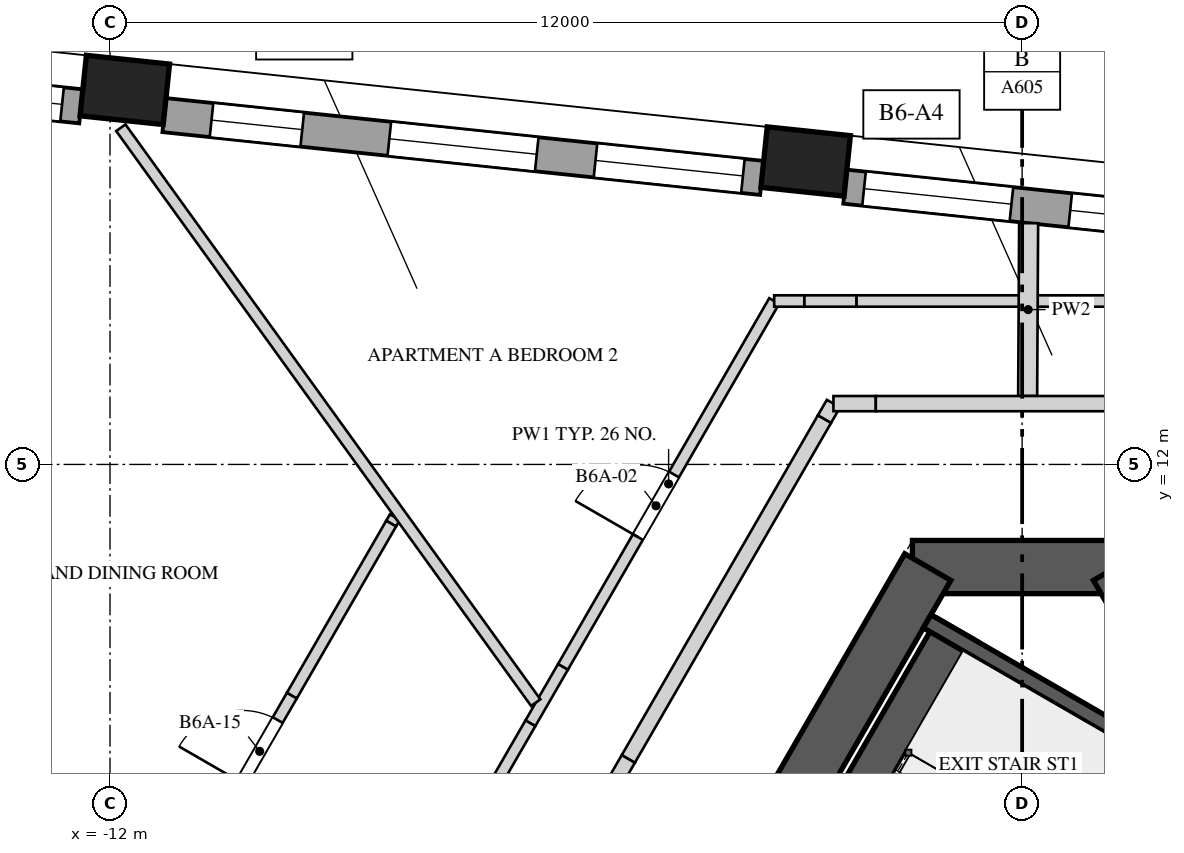
"""IFC4 building model, lengths in metres.
Left out: names, types, materials, properties, quantities, classifications, styles, units other than length and angle.
Written with IfcOpenShell. Run it as: python <this file> out.ifc"""

import sys

from ifc_helpers import new_model, si_unit, direction, frame, frame_2d, origin, origin_2d, place, context, subcontext, project, spatial, polyline, rectangle, outline, extrude, element, fill, save


model = new_model("IFC4")
c1 = context("Model", 3, precision=1e-05, world=origin(), true_north=direction((0.0, 1.0)))
c2 = subcontext(c1, "Body", "Model", "MODEL_VIEW")
j1 = project(units=[si_unit("LENGTHUNIT", "METRE"), si_unit("PLANEANGLEUNIT", "RADIAN")], contexts=[c1])
p1 = place(None, origin())
s1 = spatial("IfcSite", under=j1, at=p1, CompositionType="ELEMENT")
p2 = place(p1, origin())
s2 = spatial("IfcBuilding", under=s1, at=p2, CompositionType="ELEMENT")
p3 = place(p2, frame((0.0, 0.0, 245.2)))
s3 = spatial("IfcBuildingStorey", under=s2, at=p3, CompositionType="ELEMENT", Elevation=245.2)
p4 = place(p3, frame((1.443, 10.65, 0.0), z_axis=(0.0, 0.0, 1.0), x_axis=(-1.0, 0.0, 0.0)))
e1 = element("IfcWall", 1, at=p4, inside=s3, PredefinedType="SHEAR", context=c2, shape_type="SweptSolid", body=[
    extrude(rectangle(XDim=2.887, YDim=0.7, at=frame_2d((1.443, 0.0))), origin(), (0.0, 0.0, 1.0), 4.0),
])
p5 = place(p3, frame((-1.241, 10.65, 0.0), z_axis=(0.0, 0.0, 1.0), x_axis=(-0.500003331888, -0.866023480109, 0.0)))
e2 = element("IfcWall", 2, at=p5, inside=s3, PredefinedType="SHEAR", context=c2, shape_type="SweptSolid", body=[
    extrude(rectangle(XDim=17.205, YDim=0.7, at=frame_2d((8.603, 0.0))), origin(), (0.0, 0.0, 1.0), 4.0),
])
p6 = place(p5, frame((6.808, 0.0, 0.0)))
e3 = element("IfcOpeningElement", 3, at=p6, cuts=e2, PredefinedType="OPENING", context=c2, shape_type="SweptSolid", body=[
    extrude(rectangle(XDim=1.0, YDim=2.4, at=frame_2d((0.5, 1.2))), frame((0.0, 0.36, 0.0), z_axis=(0.0, -1.0, 0.0), x_axis=(1.0, 0.0, 0.0)), (0.0, 0.0, 1.0), 0.72),
])
p7 = place(p5, frame((14.922, 0.0, 0.0)))
e4 = element("IfcOpeningElement", 4, at=p7, cuts=e2, PredefinedType="OPENING", context=c2, shape_type="SweptSolid", body=[
    extrude(rectangle(XDim=0.8, YDim=2.1, at=frame_2d((0.4, 1.05))), frame((0.0, 0.36, 0.0), z_axis=(0.0, -1.0, 0.0), x_axis=(1.0, 0.0, 0.0)), (0.0, 0.0, 1.0), 0.72),
])
p8 = place(p3, frame((9.844, -4.25, 0.0), z_axis=(0.0, 0.0, 1.0), x_axis=(-0.500003331888, 0.866023480109, 0.0)))
e5 = element("IfcWall", 5, at=p8, inside=s3, PredefinedType="SHEAR", context=c2, shape_type="SweptSolid", body=[
    extrude(rectangle(XDim=17.205, YDim=0.7, at=frame_2d((8.603, 0.0))), origin(), (0.0, 0.0, 1.0), 4.0),
])
p9 = place(p8, frame((6.877, 0.0, 0.0)))
e6 = element("IfcOpeningElement", 6, at=p9, cuts=e5, PredefinedType="OPENING", context=c2, shape_type="SweptSolid", body=[
    extrude(rectangle(XDim=1.0, YDim=2.4, at=frame_2d((0.5, 1.2))), frame((0.0, 0.36, 0.0), z_axis=(0.0, -1.0, 0.0), x_axis=(1.0, 0.0, 0.0)), (0.0, 0.0, 1.0), 0.72),
])
for number, where, z_axis, x_axis in (
    (7, (-2.848, 15.985, 0.0), (0.0, 0.0, 1.0), (-0.995, 0.105, 0.0)),
    (8, (-11.805, 16.927, 0.0), (0.0, 0.0, 1.0), (-0.995, 0.105, 0.0)),
):
    element("IfcColumn", number, at=place(p3, frame(where, z_axis=z_axis, x_axis=x_axis)), inside=s3, PredefinedType="COLUMN", context=c2, shape_type="SweptSolid", body=[
        extrude(rectangle(XDim=1.1, YDim=0.8, at=origin_2d()), origin(), (0.0, 0.0, 1.0), 4.0),
    ])
p10 = place(p3, frame((5.534, 14.828, 0.0), z_axis=(0.0, 0.0, 1.0), x_axis=(-0.994522865711, 0.104519230663, 0.0)))
e9 = element("IfcWall", 9, at=p10, inside=s3, PredefinedType="SOLIDWALL", context=c2, shape_type="SweptSolid", body=[
    extrude(rectangle(XDim=7.907, YDim=0.45, at=frame_2d((3.953, 0.0))), origin(), (0.0, 0.0, 1.0), 3.3),
])
p11 = place(p10, frame((0.251, 0.0, 0.4)))
e10 = element("IfcOpeningElement", 10, at=p11, cuts=e9, PredefinedType="OPENING", context=c2, shape_type="SweptSolid", body=[
    extrude(rectangle(XDim=1.95, YDim=2.75, at=frame_2d((0.975, 1.375))), frame((0.0, 0.235, 0.0), z_axis=(0.0, -1.0, 0.0), x_axis=(1.0, 0.0, 0.0)), (0.0, 0.0, 1.0), 0.47),
])
p12 = place(p10, frame((2.978, 0.0, 0.4)))
e11 = element("IfcOpeningElement", 11, at=p12, cuts=e9, PredefinedType="OPENING", context=c2, shape_type="SweptSolid", body=[
    extrude(rectangle(XDim=1.95, YDim=2.75, at=frame_2d((0.975, 1.375))), frame((0.0, 0.235, 0.0), z_axis=(0.0, -1.0, 0.0), x_axis=(1.0, 0.0, 0.0)), (0.0, 0.0, 1.0), 0.47),
])
p13 = place(p10, frame((5.706, 0.0, 0.4)))
e12 = element("IfcOpeningElement", 12, at=p13, cuts=e9, PredefinedType="OPENING", context=c2, shape_type="SweptSolid", body=[
    extrude(rectangle(XDim=1.95, YDim=2.75, at=frame_2d((0.975, 1.375))), frame((0.0, 0.235, 0.0), z_axis=(0.0, -1.0, 0.0), x_axis=(1.0, 0.0, 0.0)), (0.0, 0.0, 1.0), 0.47),
])
p14 = place(p3, frame((-3.424, 15.769, 0.0), z_axis=(0.0, 0.0, 1.0), x_axis=(-0.994522528385, 0.104522440343, 0.0)))
e13 = element("IfcWall", 13, at=p14, inside=s3, PredefinedType="SOLIDWALL", context=c2, shape_type="SweptSolid", body=[
    extrude(rectangle(XDim=7.906, YDim=0.45, at=frame_2d((3.953, 0.0))), origin(), (0.0, 0.0, 1.0), 3.3),
])
p15 = place(p14, frame((0.251, 0.0, 0.4)))
e14 = element("IfcOpeningElement", 14, at=p15, cuts=e13, PredefinedType="OPENING", context=c2, shape_type="SweptSolid", body=[
    extrude(rectangle(XDim=1.95, YDim=2.75, at=frame_2d((0.975, 1.375))), frame((0.0, 0.235, 0.0), z_axis=(0.0, -1.0, 0.0), x_axis=(1.0, 0.0, 0.0)), (0.0, 0.0, 1.0), 0.47),
])
p16 = place(p14, frame((2.978, 0.0, 0.4)))
e15 = element("IfcOpeningElement", 15, at=p16, cuts=e13, PredefinedType="OPENING", context=c2, shape_type="SweptSolid", body=[
    extrude(rectangle(XDim=1.95, YDim=2.75, at=frame_2d((0.975, 1.375))), frame((0.0, 0.235, 0.0), z_axis=(0.0, -1.0, 0.0), x_axis=(1.0, 0.0, 0.0)), (0.0, 0.0, 1.0), 0.47),
])
p17 = place(p14, frame((6.081, 0.0, 0.4)))
e16 = element("IfcOpeningElement", 16, at=p17, cuts=e13, PredefinedType="OPENING", context=c2, shape_type="SweptSolid", body=[
    extrude(rectangle(XDim=1.2, YDim=2.75, at=frame_2d((0.6, 1.375))), frame((0.0, 0.235, 0.0), z_axis=(0.0, -1.0, 0.0), x_axis=(1.0, 0.0, 0.0)), (0.0, 0.0, 1.0), 0.47),
])
p18 = place(p3, frame((-12.381, 16.711, 0.0), z_axis=(0.0, 0.0, 1.0), x_axis=(-0.994520717537, 0.104539668977, 0.0)))
e17 = element("IfcWall", 17, at=p18, inside=s3, PredefinedType="SOLIDWALL", context=c2, shape_type="SweptSolid", body=[
    extrude(rectangle(XDim=2.452, YDim=0.45, at=frame_2d((1.226, 0.0))), origin(), (0.0, 0.0, 1.0), 3.3),
])
p19 = place(p18, frame((0.251, 0.0, 0.4)))
e18 = element("IfcOpeningElement", 18, at=p19, cuts=e17, PredefinedType="OPENING", context=c2, shape_type="SweptSolid", body=[
    extrude(rectangle(XDim=1.95, YDim=2.75, at=frame_2d((0.975, 1.375))), frame((0.0, 0.235, 0.0), z_axis=(0.0, -1.0, 0.0), x_axis=(1.0, 0.0, 0.0)), (0.0, 0.0, 1.0), 0.47),
])
p20 = place(p3, frame((-0.853, 9.823, 0.0), z_axis=(0.0, 0.0, 1.0), x_axis=(-0.500009909098, -0.866019682689, 0.0)))
e19 = element("IfcWall", 19, at=p20, inside=s3, PredefinedType="SOLIDWALL", context=c2, shape_type="SweptSolid", body=[
    extrude(rectangle(XDim=6.2, YDim=0.6, at=frame_2d((3.1, 0.0))), origin(), (0.0, 0.0, 1.0), 3.65),
])
p21 = place(p3, frame((1.876, 8.85, 0.0), z_axis=(0.0, 0.0, 1.0), x_axis=(-0.499998042495, -0.866026533947, 0.0)))
e20 = element("IfcWall", 20, at=p21, inside=s3, PredefinedType="SOLIDWALL", context=c2, shape_type="SweptSolid", body=[
    extrude(rectangle(XDim=6.723, YDim=0.2, at=frame_2d((3.361, 0.0))), origin(), (0.0, 0.0, 1.0), 3.65),
])
p22 = place(p3, frame((1.479, 8.361, 0.0), z_axis=(0.0, 0.0, 1.0), x_axis=(-0.866035871367, 0.499981869177, 0.0)))
e21 = element("IfcWall", 21, at=p22, inside=s3, PredefinedType="SOLIDWALL", context=c2, shape_type="SweptSolid", body=[
    extrude(rectangle(XDim=3.15, YDim=0.2, at=frame_2d((1.575, 0.0))), origin(), (0.0, 0.0, 1.0), 3.65),
])
p23 = place(p3, frame((-7.38, 7.017, 0.0), z_axis=(0.0, 0.0, 1.0), x_axis=(0.500012159746, 0.866018383238, 0.0)))
e22 = element("IfcWall", 22, at=p23, inside=s3, PredefinedType="PARTITIONING", context=c2, shape_type="SweptSolid", body=[
    extrude(rectangle(XDim=1.824, YDim=0.15, at=frame_2d((0.912, 0.0))), origin(), (0.0, 0.0, 1.0), 3.65),
])
p24 = place(p3, frame((-6.468, 8.597, 0.0), z_axis=(0.0, 0.0, 1.0), x_axis=(0.500035209441, 0.86600507465, 0.0)))
e23 = element("IfcWall", 23, at=p24, inside=s3, PredefinedType="PARTITIONING", context=c2, shape_type="SweptSolid", body=[
    extrude(rectangle(XDim=0.856, YDim=0.15, at=frame_2d((0.428, 0.0))), origin(), (0.0, 0.0, 1.0), 2.75),
])
p25 = place(p3, frame((-6.04, 9.338, 0.0), z_axis=(0.0, 0.0, 1.0), x_axis=(0.500014044516, 0.866017295027, 0.0)))
e24 = element("IfcWall", 24, at=p25, inside=s3, PredefinedType="PARTITIONING", context=c2, shape_type="SweptSolid", body=[
    extrude(rectangle(XDim=5.556, YDim=0.15, at=frame_2d((2.778, 0.0))), origin(), (0.0, 0.0, 1.0), 3.65),
])
p26 = place(p25, frame((1.971, 0.0, 0.0)))
e25 = element("IfcOpeningElement", 25, at=p26, cuts=e24, PredefinedType="OPENING", context=c2, shape_type="SweptSolid", body=[
    extrude(rectangle(XDim=0.95, YDim=2.4, at=frame_2d((0.475, 1.2))), frame((0.0, 0.085, 0.0), z_axis=(0.0, -1.0, 0.0), x_axis=(1.0, 0.0, 0.0)), (0.0, 0.0, 1.0), 0.17),
])
p27 = place(p3, frame((-10.294, 7.771, 0.0), z_axis=(0.0, 0.0, 1.0), x_axis=(0.500117582512, 0.865957506846, 0.0)))
e26 = element("IfcWall", 26, at=p27, inside=s3, PredefinedType="PARTITIONING", context=c2, shape_type="SweptSolid", body=[
    extrude(outline(polyline([(0.0, 0.0), (1.373, 0.0), (1.373, 2.55), (0.481, 2.55), (0.481, 3.65), (0.0, 3.65), (0.0, 0.0)])), frame((0.0, 0.075, 0.0), z_axis=(0.0, -1.0, 0.0), x_axis=(1.0, 0.0, 0.0)), (0.0, 0.0, 1.0), 0.15),
])
p28 = place(p27, frame((0.05, 0.0, 0.0)))
e27 = element("IfcOpeningElement", 27, at=p28, cuts=e26, PredefinedType="OPENING", context=c2, shape_type="SweptSolid", body=[
    extrude(rectangle(XDim=0.95, YDim=2.4, at=frame_2d((0.475, 1.2))), frame((0.0, 0.085, 0.0), z_axis=(0.0, -1.0, 0.0), x_axis=(1.0, 0.0, 0.0)), (0.0, 0.0, 1.0), 0.17),
])
p29 = place(p3, frame((-9.607, 8.96, 0.0), z_axis=(0.0, 0.0, 1.0), x_axis=(0.49994612994, 0.866056503444, 0.0)))
e28 = element("IfcWall", 28, at=p29, inside=s3, PredefinedType="PARTITIONING", context=c2, shape_type="SweptSolid", body=[
    extrude(rectangle(XDim=2.614, YDim=0.15, at=frame_2d((1.307, 0.0))), origin(), (0.0, 0.0, 1.0), 3.65),
])
p30 = place(p3, frame((-8.3, 11.224, 0.0), z_axis=(0.0, 0.0, 1.0), x_axis=(0.501641482138, 0.865075617156, 0.0)))
e29 = element("IfcWall", 29, at=p30, inside=s3, PredefinedType="PARTITIONING", context=c2, shape_type="SweptSolid", body=[
    extrude(rectangle(XDim=0.095, YDim=0.15, at=frame_2d((0.048, 0.0))), origin(), (0.0, 0.0, 1.0), 2.75),
])
p31 = place(p3, frame((-11.858, 16.429, 0.0), z_axis=(0.0, 0.0, 1.0), x_axis=(0.585232485498, -0.810865548607, 0.0)))
e30 = element("IfcWall", 30, at=p31, inside=s3, PredefinedType="PARTITIONING", context=c2, shape_type="SweptSolid", body=[
    extrude(rectangle(XDim=9.327, YDim=0.15, at=frame_2d((4.664, 0.0))), origin(), (0.0, 0.0, 1.0), 2.75),
])
p32 = place(p3, frame((-3.262, 14.15, 0.0), z_axis=(0.0, 0.0, 1.0), x_axis=(1.0, 0.0, 0.0)))
e31 = element("IfcWall", 31, at=p32, inside=s3, PredefinedType="PARTITIONING", context=c2, shape_type="SweptSolid", body=[
    extrude(rectangle(XDim=0.398, YDim=0.15, at=frame_2d((0.199, 0.0))), origin(), (0.0, 0.0, 1.0), 3.65),
])
p33 = place(p3, frame((-2.864, 14.15, 0.0), z_axis=(0.0, 0.0, 1.0), x_axis=(1.0, 0.0, 0.0)))
e32 = element("IfcWall", 32, at=p33, inside=s3, PredefinedType="PARTITIONING", context=c2, shape_type="SweptSolid", body=[
    extrude(rectangle(XDim=0.686, YDim=0.15, at=frame_2d((0.343, 0.0))), origin(), (0.0, 0.0, 1.0), 2.95),
])
p34 = place(p3, frame((-2.178, 14.15, 0.0), z_axis=(0.0, 0.0, 1.0), x_axis=(1.0, 0.0, 0.0)))
e33 = element("IfcWall", 33, at=p34, inside=s3, PredefinedType="PARTITIONING", context=c2, shape_type="SweptSolid", body=[
    extrude(rectangle(XDim=5.44, YDim=0.15, at=frame_2d((2.72, 0.0))), origin(), (0.0, 0.0, 1.0), 3.65),
])
p35 = place(p3, frame((0.085, 15.174, 0.0), z_axis=(0.0, 0.0, 1.0), x_axis=(-0.005582307008, -0.999984418803, 0.0)))
e34 = element("IfcWall", 34, at=p35, inside=s3, PredefinedType="SOLIDWALL", context=c2, shape_type="SweptSolid", body=[
    extrude(rectangle(XDim=2.274, YDim=0.25, at=frame_2d((1.137, 0.0))), origin(), (0.0, 0.0, 1.0), 3.65),
])
p36 = place(p3, frame((-5.622, 7.362, 0.0), z_axis=(0.0, 0.0, 1.0), x_axis=(0.500121072013, 0.86595549154, 0.0)))
e35 = element("IfcWall", 35, at=p36, inside=s3, PredefinedType="SOLIDWALL", context=c2, shape_type="SweptSolid", body=[
    extrude(rectangle(XDim=0.884, YDim=0.2, at=frame_2d((0.442, 0.0))), origin(), (0.0, 0.0, 1.0), 2.75),
])
p37 = place(p3, frame((-5.18, 8.127, 0.0), z_axis=(0.0, 0.0, 1.0), x_axis=(0.499995433041, 0.866028040503, 0.0)))
e36 = element("IfcWall", 36, at=p37, inside=s3, PredefinedType="SOLIDWALL", context=c2, shape_type="SweptSolid", body=[
    extrude(rectangle(XDim=5.161, YDim=0.2, at=frame_2d((2.581, 0.0))), origin(), (0.0, 0.0, 1.0), 3.65),
])
p38 = place(p3, frame((-2.6, 12.597, 0.0), z_axis=(0.0, 0.0, 1.0), x_axis=(0.49972245349, 0.866185586049, 0.0)))
e37 = element("IfcWall", 37, at=p38, inside=s3, PredefinedType="SOLIDWALL", context=c2, shape_type="SweptSolid", body=[
    extrude(rectangle(XDim=0.235, YDim=0.2, at=frame_2d((0.117, 0.0))), origin(), (0.0, 0.0, 1.0), 2.95),
])
p39 = place(p3, frame((-2.483, 12.8, 0.0), z_axis=(0.0, 0.0, 1.0), x_axis=(1.0, 0.0, 0.0)))
e38 = element("IfcWall", 38, at=p39, inside=s3, PredefinedType="SOLIDWALL", context=c2, shape_type="SweptSolid", body=[
    extrude(rectangle(XDim=0.558, YDim=0.2, at=frame_2d((0.279, 0.0))), origin(), (0.0, 0.0, 1.0), 2.95),
])
p40 = place(p3, frame((-1.925, 12.8, 0.0), z_axis=(0.0, 0.0, 1.0), x_axis=(1.0, 0.0, 0.0)))
e39 = element("IfcWall", 39, at=p40, inside=s3, PredefinedType="SOLIDWALL", context=c2, shape_type="SweptSolid", body=[
    extrude(rectangle(XDim=4.408, YDim=0.2, at=frame_2d((2.204, 0.0))), origin(), (0.0, 0.0, 1.0), 3.65),
])
p41 = place(p12, origin())
e40 = element("IfcWindow", 40, at=p41, inside=s3, PartitioningType="SINGLE_PANEL", PredefinedType="WINDOW", context=c2, shape_type="SweptSolid", body=[
    extrude(rectangle(XDim=1.95, YDim=2.75, at=frame_2d((0.975, 1.375))), frame((0.0, 0.03, 0.0), z_axis=(0.0, -1.0, 0.0), x_axis=(1.0, 0.0, 0.0)), (0.0, 0.0, 1.0), 0.06),
])
fill(e11, e40)
p42 = place(p13, origin())
e41 = element("IfcWindow", 41, at=p42, inside=s3, PartitioningType="SINGLE_PANEL", PredefinedType="WINDOW", context=c2, shape_type="SweptSolid", body=[
    extrude(rectangle(XDim=1.95, YDim=2.75, at=frame_2d((0.975, 1.375))), frame((0.0, 0.03, 0.0), z_axis=(0.0, -1.0, 0.0), x_axis=(1.0, 0.0, 0.0)), (0.0, 0.0, 1.0), 0.06),
])
fill(e12, e41)
p43 = place(p15, origin())
e42 = element("IfcWindow", 42, at=p43, inside=s3, PartitioningType="SINGLE_PANEL", PredefinedType="WINDOW", context=c2, shape_type="SweptSolid", body=[
    extrude(rectangle(XDim=1.95, YDim=2.75, at=frame_2d((0.975, 1.375))), frame((0.0, 0.03, 0.0), z_axis=(0.0, -1.0, 0.0), x_axis=(1.0, 0.0, 0.0)), (0.0, 0.0, 1.0), 0.06),
])
fill(e14, e42)
p44 = place(p16, origin())
e43 = element("IfcWindow", 43, at=p44, inside=s3, PartitioningType="SINGLE_PANEL", PredefinedType="WINDOW", context=c2, shape_type="SweptSolid", body=[
    extrude(rectangle(XDim=1.95, YDim=2.75, at=frame_2d((0.975, 1.375))), frame((0.0, 0.03, 0.0), z_axis=(0.0, -1.0, 0.0), x_axis=(1.0, 0.0, 0.0)), (0.0, 0.0, 1.0), 0.06),
])
fill(e15, e43)
p45 = place(p17, origin())
e44 = element("IfcWindow", 44, at=p45, inside=s3, PartitioningType="SINGLE_PANEL", PredefinedType="WINDOW", context=c2, shape_type="SweptSolid", body=[
    extrude(rectangle(XDim=1.2, YDim=2.75, at=frame_2d((0.6, 1.375))), frame((0.0, 0.03, 0.0), z_axis=(0.0, -1.0, 0.0), x_axis=(1.0, 0.0, 0.0)), (0.0, 0.0, 1.0), 0.06),
])
fill(e16, e44)
p46 = place(p19, origin())
e45 = element("IfcWindow", 45, at=p46, inside=s3, PartitioningType="SINGLE_PANEL", PredefinedType="WINDOW", context=c2, shape_type="SweptSolid", body=[
    extrude(rectangle(XDim=1.95, YDim=2.75, at=frame_2d((0.975, 1.375))), frame((0.0, 0.03, 0.0), z_axis=(0.0, -1.0, 0.0), x_axis=(1.0, 0.0, 0.0)), (0.0, 0.0, 1.0), 0.06),
])
fill(e18, e45)
p47 = place(p26, origin())
e46 = element("IfcDoor", 46, at=p47, inside=s3, OperationType="SINGLE_SWING_RIGHT", PredefinedType="DOOR", context=c2, shape_type="SweptSolid", body=[
    extrude(rectangle(XDim=0.95, YDim=2.4, at=frame_2d((0.475, 1.2))), frame((0.0, 0.025, 0.0), z_axis=(0.0, -1.0, 0.0), x_axis=(1.0, 0.0, 0.0)), (0.0, 0.0, 1.0), 0.05),
])
fill(e25, e46)
p48 = place(p28, origin())
e47 = element("IfcDoor", 47, at=p48, inside=s3, OperationType="SINGLE_SWING_LEFT", PredefinedType="DOOR", context=c2, shape_type="SweptSolid", body=[
    extrude(rectangle(XDim=0.95, YDim=2.4, at=frame_2d((0.475, 1.2))), frame((0.0, 0.025, 0.0), z_axis=(0.0, -1.0, 0.0), x_axis=(1.0, 0.0, 0.0)), (0.0, 0.0, 1.0), 0.05),
])
fill(e27, e47)
save(model, sys.argv[1])
